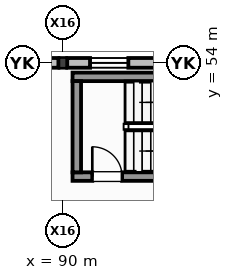
"""IFC4 building model, lengths in metres.
Left out: names, types, materials, properties, quantities, classifications, styles, units other than length and angle.
Written with IfcOpenShell. Run it as: python <this file> out.ifc"""

import sys

from ifc_helpers import new_model, si_unit, direction, frame, frame_2d, origin, origin_2d, place, context, subcontext, project, spatial, rectangle, i_section, extrude, element, fill, save


model = new_model("IFC4")
c1 = context("Model", 3, precision=1e-05, world=origin(), true_north=direction((0.0, 1.0)))
c2 = subcontext(c1, "Body", "Model", "MODEL_VIEW")
j1 = project(units=[si_unit("LENGTHUNIT", "METRE"), si_unit("PLANEANGLEUNIT", "RADIAN")], contexts=[c1])
p1 = place(None, origin())
s1 = spatial("IfcSite", under=j1, at=p1, CompositionType="ELEMENT")
p2 = place(p1, origin())
s2 = spatial("IfcBuilding", under=s1, at=p2, CompositionType="ELEMENT")
p3 = place(p2, frame((0.0, 0.0, 6.0)))
s3 = spatial("IfcBuildingStorey", under=s2, at=p3, CompositionType="ELEMENT", Elevation=6.0)
p4 = place(p3, frame((90.0, 54.0, 0.0), z_axis=(0.0, 0.0, 1.0), x_axis=(1.0, 0.0, 0.0)))
e1 = element("IfcColumn", 1, at=p4, inside=s3, PredefinedType="COLUMN", context=c2, shape_type="SweptSolid", body=[
    extrude(i_section(OverallWidth=0.254, OverallDepth=0.353, WebThickness=0.01, FlangeThickness=0.016, at=origin_2d()), origin(), (0.0, 0.0, 1.0), 4.0),
])
p5 = place(p3, frame((89.855, 54.0, 0.0), z_axis=(0.0, 0.0, 1.0), x_axis=(-1.0, 0.0, 0.0)))
e2 = element("IfcWall", 2, at=p5, inside=s3, PredefinedType="STANDARD", context=c2, shape_type="SweptSolid", body=[
    extrude(rectangle(XDim=5.71, YDim=0.32, at=frame_2d((2.855, 0.0))), origin(), (0.0, 0.0, 1.0), 3.153),
])
p6 = place(p5, frame((1.131, 0.0, 1.18)))
e3 = element("IfcOpeningElement", 3, at=p6, cuts=e2, PredefinedType="OPENING", context=c2, shape_type="SweptSolid", body=[
    extrude(rectangle(XDim=0.9, YDim=0.9, at=frame_2d((0.45, 0.45))), frame((0.0, 0.17, 0.0), z_axis=(0.0, -1.0, 0.0), x_axis=(1.0, 0.0, 0.0)), (0.0, 0.0, 1.0), 0.34),
])
p7 = place(p5, frame((3.483, 0.0, 0.96)))
e4 = element("IfcOpeningElement", 4, at=p7, cuts=e2, PredefinedType="OPENING", context=c2, shape_type="SweptSolid", body=[
    extrude(rectangle(XDim=1.14, YDim=1.14, at=frame_2d((0.57, 0.57))), frame((0.0, 0.17, 0.0), z_axis=(0.0, -1.0, 0.0), x_axis=(1.0, 0.0, 0.0)), (0.0, 0.0, 1.0), 0.34),
])
p8 = place(p3, frame((95.855, 54.0, 0.0), z_axis=(0.0, 0.0, 1.0), x_axis=(-1.0, 0.0, 0.0)))
e5 = element("IfcWall", 5, at=p8, inside=s3, PredefinedType="STANDARD", context=c2, shape_type="SweptSolid", body=[
    extrude(rectangle(XDim=5.71, YDim=0.32, at=frame_2d((2.855, 0.0))), origin(), (0.0, 0.0, 1.0), 3.153),
])
p9 = place(p8, frame((0.775, 0.0, 1.42)))
e6 = element("IfcOpeningElement", 6, at=p9, cuts=e5, PredefinedType="OPENING", context=c2, shape_type="SweptSolid", body=[
    extrude(rectangle(XDim=1.02, YDim=1.02, at=frame_2d((0.51, 0.51))), frame((0.0, 0.17, 0.0), z_axis=(0.0, -1.0, 0.0), x_axis=(1.0, 0.0, 0.0)), (0.0, 0.0, 1.0), 0.34),
])
p10 = place(p8, frame((3.699, 0.0, 1.28)))
e7 = element("IfcOpeningElement", 7, at=p10, cuts=e5, PredefinedType="OPENING", context=c2, shape_type="SweptSolid", body=[
    extrude(rectangle(XDim=1.26, YDim=1.26, at=frame_2d((0.63, 0.63))), frame((0.0, 0.17, 0.0), z_axis=(0.0, -1.0, 0.0), x_axis=(1.0, 0.0, 0.0)), (0.0, 0.0, 1.0), 0.34),
])
p11 = place(p3, frame((90.32, 50.26, 0.0), z_axis=(0.0, 0.0, 1.0), x_axis=(1.0, 0.0, 0.0)))
e8 = element("IfcWall", 8, at=p11, inside=s3, PredefinedType="SHEAR", context=c2, shape_type="SweptSolid", body=[
    extrude(rectangle(XDim=8.16, YDim=0.28, at=frame_2d((4.08, 0.0))), origin(), (0.0, 0.0, 1.0), 4.0),
])
p12 = place(p11, frame((0.65, 0.0, 0.0)))
e9 = element("IfcOpeningElement", 9, at=p12, cuts=e8, PredefinedType="OPENING", context=c2, shape_type="SweptSolid", body=[
    extrude(rectangle(XDim=0.98, YDim=2.15, at=frame_2d((0.49, 1.075))), frame((0.0, 0.15, 0.0), z_axis=(0.0, -1.0, 0.0), x_axis=(1.0, 0.0, 0.0)), (0.0, 0.0, 1.0), 0.3),
])
p13 = place(p3, frame((98.48, 53.54, 0.0), z_axis=(0.0, 0.0, 1.0), x_axis=(-1.0, 0.0, 0.0)))
e10 = element("IfcWall", 10, at=p13, inside=s3, PredefinedType="SHEAR", context=c2, shape_type="SweptSolid", body=[
    extrude(rectangle(XDim=8.16, YDim=0.28, at=frame_2d((4.08, 0.0))), origin(), (0.0, 0.0, 1.0), 4.0),
])
p14 = place(p3, frame((90.46, 53.4, 0.0), z_axis=(0.0, 0.0, 1.0), x_axis=(0.0, -1.0, 0.0)))
e11 = element("IfcWall", 11, at=p14, inside=s3, PredefinedType="SHEAR", context=c2, shape_type="SweptSolid", body=[
    extrude(rectangle(XDim=3.0, YDim=0.28, at=frame_2d((1.5, 0.0))), origin(), (0.0, 0.0, 1.0), 4.0),
])
p15 = place(p10, origin())
e12 = element("IfcWindow", 12, at=p15, inside=s3, PartitioningType="SINGLE_PANEL", PredefinedType="WINDOW", context=c2, shape_type="SweptSolid", body=[
    extrude(rectangle(XDim=1.26, YDim=1.26, at=frame_2d((0.63, 0.63))), frame((0.0, 0.03, 0.0), z_axis=(0.0, -1.0, 0.0), x_axis=(1.0, 0.0, 0.0)), (0.0, 0.0, 1.0), 0.06),
])
fill(e7, e12)
p16 = place(p12, origin())
e13 = element("IfcDoor", 13, at=p16, inside=s3, OperationType="SINGLE_SWING_LEFT", PredefinedType="DOOR", context=c2, shape_type="SweptSolid", body=[
    extrude(rectangle(XDim=0.98, YDim=2.15, at=frame_2d((0.49, 1.075))), frame((0.0, 0.025, 0.0), z_axis=(0.0, -1.0, 0.0), x_axis=(1.0, 0.0, 0.0)), (0.0, 0.0, 1.0), 0.05),
])
fill(e9, e13)
save(model, sys.argv[1])
